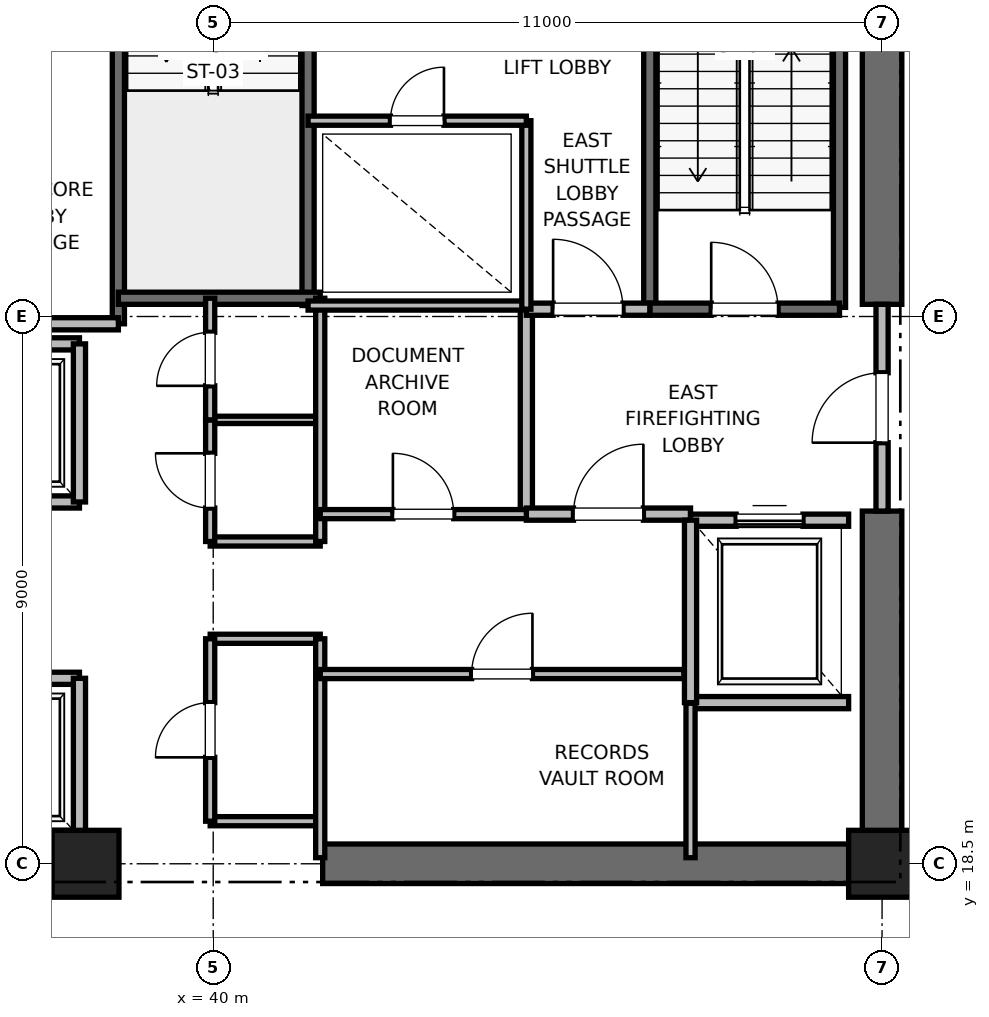
"""IFC4 building model, lengths in metres.
Left out: names, types, materials, properties, quantities, classifications, styles, units other than length and angle.
Written with IfcOpenShell. Run it as: python <this file> out.ifc"""

import sys

from ifc_helpers import new_model, si_unit, direction, frame, frame_2d, origin, origin_2d, place, context, subcontext, project, spatial, rectangle, extrude, element, fill, save


model = new_model("IFC4")
c1 = context("Model", 3, precision=1e-05, world=origin(), true_north=direction((0.0, 1.0)))
c2 = subcontext(c1, "Body", "Model", "MODEL_VIEW")
j1 = project(units=[si_unit("LENGTHUNIT", "METRE"), si_unit("PLANEANGLEUNIT", "RADIAN")], contexts=[c1])
p1 = place(None, origin())
s1 = spatial("IfcSite", under=j1, at=p1, CompositionType="ELEMENT")
p2 = place(p1, origin())
s2 = spatial("IfcBuilding", under=s1, at=p2, CompositionType="ELEMENT")
p3 = place(p2, frame((0.0, 0.0, 103.6)))
s3 = spatial("IfcBuildingStorey", under=s2, at=p3, CompositionType="ELEMENT", Elevation=103.6)
for number, where, z_axis, x_axis in (
    (1, (51.0, 18.5, 0.0), (0.0, 0.0, 1.0), (1.0, 0.0, 0.0)),
    (2, (37.9, 18.5, 0.0), (0.0, 0.0, 1.0), (1.0, 0.0, 0.0)),
):
    element("IfcColumn", number, at=place(p3, frame(where, z_axis=z_axis, x_axis=x_axis)), inside=s3, PredefinedType="PILASTER", context=c2, shape_type="SweptSolid", body=[
        extrude(rectangle(XDim=1.1, YDim=1.1, at=origin_2d()), origin(), (0.0, 0.0, 1.0), 4.0),
    ])
for number, where, z_axis, x_axis in (
    (3, (29.0, 18.5, 0.0), (0.0, 0.0, 1.0), (1.0, 0.0, 0.0)),
    (4, (41.8, 18.5, 0.0), (0.0, 0.0, 1.0), (1.0, 0.0, 0.0)),
):
    element("IfcWall", number, at=place(p3, frame(where, z_axis=z_axis, x_axis=x_axis)), inside=s3, PredefinedType="SHEAR", context=c2, shape_type="SweptSolid", body=[
        extrude(rectangle(XDim=9.2, YDim=0.65, at=frame_2d((4.6, 0.0))), origin(), (0.0, 0.0, 1.0), 3.7),
    ])
p4 = place(p3, frame((51.0, 18.5, 0.0), z_axis=(0.0, 0.0, 1.0), x_axis=(0.0, 1.0, 0.0)))
e5 = element("IfcWall", 5, at=p4, inside=s3, PredefinedType="SHEAR", context=c2, shape_type="SweptSolid", body=[
    extrude(rectangle(XDim=5.8, YDim=0.65, at=frame_2d((2.9, 0.0))), origin(), (0.0, 0.0, 1.0), 3.7),
])
p5 = place(p3, frame((51.0, 27.7, 0.0), z_axis=(0.0, 0.0, 1.0), x_axis=(0.0, 1.0, 0.0)))
e6 = element("IfcWall", 6, at=p5, inside=s3, PredefinedType="SHEAR", context=c2, shape_type="SweptSolid", body=[
    extrude(rectangle(XDim=8.8, YDim=0.65, at=frame_2d((4.4, 0.0))), origin(), (0.0, 0.0, 1.0), 3.7),
])
p6 = place(p3, frame((50.3, 27.65, 0.0), z_axis=(0.0, 0.0, 1.0), x_axis=(0.0, 1.0, 0.0)))
e7 = element("IfcWall", 7, at=p6, inside=s3, PredefinedType="SOLIDWALL", context=c2, shape_type="SweptSolid", body=[
    extrude(rectangle(XDim=8.15, YDim=0.2, at=frame_2d((4.075, 0.0))), origin(), (0.0, 0.0, 1.0), 3.7),
])
p7 = place(p3, frame((47.18, 27.62, 0.0), z_axis=(0.0, 0.0, 1.0), x_axis=(0.0, 1.0, 0.0)))
e8 = element("IfcWall", 8, at=p7, inside=s3, PredefinedType="SOLIDWALL", context=c2, shape_type="SweptSolid", body=[
    extrude(rectangle(XDim=8.18, YDim=0.2, at=frame_2d((4.09, 0.0))), origin(), (0.0, 0.0, 1.0), 3.7),
])
p8 = place(p3, frame((47.18, 27.62, 0.0), z_axis=(0.0, 0.0, 1.0), x_axis=(1.0, 0.0, 0.0)))
e9 = element("IfcWall", 9, at=p8, inside=s3, PredefinedType="SOLIDWALL", context=c2, shape_type="SweptSolid", body=[
    extrude(rectangle(XDim=3.12, YDim=0.2, at=frame_2d((1.56, 0.0))), origin(), (0.0, 0.0, 1.0), 3.7),
])
p9 = place(p8, frame((1.01, 0.0, 0.0)))
e10 = element("IfcOpeningElement", 10, at=p9, cuts=e9, PredefinedType="OPENING", context=c2, shape_type="SweptSolid", body=[
    extrude(rectangle(XDim=1.1, YDim=2.15, at=frame_2d((0.55, 1.075))), frame((0.0, 0.1, 0.0), z_axis=(0.0, -1.0, 0.0), x_axis=(1.0, 0.0, 0.0)), (0.0, 0.0, 1.0), 0.2),
])
p10 = place(p3, frame((38.44, 27.38, 0.0), z_axis=(0.0, 0.0, 1.0), x_axis=(0.0, 1.0, 0.0)))
e11 = element("IfcWall", 11, at=p10, inside=s3, PredefinedType="SOLIDWALL", context=c2, shape_type="SweptSolid", body=[
    extrude(rectangle(XDim=8.87, YDim=0.2, at=frame_2d((4.435, 0.0))), origin(), (0.0, 0.0, 1.0), 3.7),
])
p11 = place(p3, frame((41.56, 27.68, 0.0), z_axis=(0.0, 0.0, 1.0), x_axis=(0.0, 1.0, 0.0)))
e12 = element("IfcWall", 12, at=p11, inside=s3, PredefinedType="SOLIDWALL", context=c2, shape_type="SweptSolid", body=[
    extrude(rectangle(XDim=8.57, YDim=0.2, at=frame_2d((4.285, 0.0))), origin(), (0.0, 0.0, 1.0), 3.7),
])
p12 = place(p3, frame((38.44, 27.8, 0.0), z_axis=(0.0, 0.0, 1.0), x_axis=(1.0, 0.0, 0.0)))
e13 = element("IfcWall", 13, at=p12, inside=s3, PredefinedType="SOLIDWALL", context=c2, shape_type="SweptSolid", body=[
    extrude(rectangle(XDim=3.32, YDim=0.2, at=frame_2d((1.66, 0.0))), origin(), (0.0, 0.0, 1.0), 3.7),
])
p13 = place(p3, frame((32.82, 27.38, 0.0), z_axis=(0.0, 0.0, 1.0), x_axis=(1.0, 0.0, 0.0)))
e14 = element("IfcWall", 14, at=p13, inside=s3, PredefinedType="PARTITIONING", context=c2, shape_type="SweptSolid", body=[
    extrude(rectangle(XDim=5.62, YDim=0.2, at=frame_2d((2.81, 0.0))), origin(), (0.0, 0.0, 1.0), 3.7),
])
p14 = place(p3, frame((45.15, 24.25, 0.0), z_axis=(0.0, 0.0, 1.0), x_axis=(0.0, 1.0, 0.0)))
e15 = element("IfcWall", 15, at=p14, inside=s3, PredefinedType="PARTITIONING", context=c2, shape_type="SweptSolid", body=[
    extrude(rectangle(XDim=3.37, YDim=0.2, at=frame_2d((1.685, 0.0))), origin(), (0.0, 0.0, 1.0), 3.7),
])
p15 = place(p3, frame((45.15, 24.25, 0.0), z_axis=(0.0, 0.0, 1.0), x_axis=(1.0, 0.0, 0.0)))
e16 = element("IfcWall", 16, at=p15, inside=s3, PredefinedType="PARTITIONING", context=c2, shape_type="SweptSolid", body=[
    extrude(rectangle(XDim=2.7, YDim=0.2, at=frame_2d((1.35, 0.0))), origin(), (0.0, 0.0, 1.0), 3.7),
])
p16 = place(p15, frame((0.775, 0.0, 0.0)))
e17 = element("IfcOpeningElement", 17, at=p16, cuts=e16, PredefinedType="OPENING", context=c2, shape_type="SweptSolid", body=[
    extrude(rectangle(XDim=1.15, YDim=2.2, at=frame_2d((0.575, 1.1))), frame((0.0, 0.1, 0.0), z_axis=(0.0, -1.0, 0.0), x_axis=(1.0, 0.0, 0.0)), (0.0, 0.0, 1.0), 0.2),
])
p17 = place(p3, frame((45.15, 27.62, 0.0), z_axis=(0.0, 0.0, 1.0), x_axis=(1.0, 0.0, 0.0)))
e18 = element("IfcWall", 18, at=p17, inside=s3, PredefinedType="PARTITIONING", context=c2, shape_type="SweptSolid", body=[
    extrude(rectangle(XDim=2.03, YDim=0.2, at=frame_2d((1.015, 0.0))), origin(), (0.0, 0.0, 1.0), 3.7),
])
p18 = place(p17, frame((0.44, 0.0, 0.0)))
e19 = element("IfcOpeningElement", 19, at=p18, cuts=e18, PredefinedType="OPENING", context=c2, shape_type="SweptSolid", body=[
    extrude(rectangle(XDim=1.15, YDim=2.2, at=frame_2d((0.575, 1.1))), frame((0.0, 0.1, 0.0), z_axis=(0.0, -1.0, 0.0), x_axis=(1.0, 0.0, 0.0)), (0.0, 0.0, 1.0), 0.2),
])
p19 = place(p3, frame((51.0, 24.3, 0.0), z_axis=(0.0, 0.0, 1.0), x_axis=(0.0, 1.0, 0.0)))
e20 = element("IfcWall", 20, at=p19, inside=s3, PredefinedType="PARTITIONING", context=c2, shape_type="SweptSolid", body=[
    extrude(rectangle(XDim=3.4, YDim=0.2, at=frame_2d((1.7, 0.0))), origin(), (0.0, 0.0, 1.0), 2.48),
])
p20 = place(p19, frame((1.125, 0.0, 0.0)))
e21 = element("IfcOpeningElement", 21, at=p20, cuts=e20, PredefinedType="OPENING", context=c2, shape_type="SweptSolid", body=[
    extrude(rectangle(XDim=1.15, YDim=2.2, at=frame_2d((0.575, 1.1))), frame((0.0, 0.1, 0.0), z_axis=(0.0, -1.0, 0.0), x_axis=(1.0, 0.0, 0.0)), (0.0, 0.0, 1.0), 0.2),
])
p21 = place(p3, frame((47.85, 21.15, 0.0), z_axis=(0.0, 0.0, 1.0), x_axis=(1.0, 0.0, 0.0)))
e22 = element("IfcWall", 22, at=p21, inside=s3, PredefinedType="SOLIDWALL", context=c2, shape_type="SweptSolid", body=[
    extrude(rectangle(XDim=2.6, YDim=0.2, at=frame_2d((1.3, 0.0))), origin(), (0.0, 0.0, 1.0), 3.7),
])
p22 = place(p3, frame((50.45, 24.15, 0.0), z_axis=(0.0, 0.0, 1.0), x_axis=(-1.0, 0.0, 0.0)))
e23 = element("IfcWall", 23, at=p22, inside=s3, PredefinedType="SOLIDWALL", context=c2, shape_type="SweptSolid", body=[
    extrude(rectangle(XDim=2.6, YDim=0.2, at=frame_2d((1.3, 0.0))), origin(), (0.0, 0.0, 1.0), 2.48),
])
p23 = place(p22, frame((0.75, 0.0, 0.0)))
e24 = element("IfcOpeningElement", 24, at=p23, cuts=e23, PredefinedType="OPENING", context=c2, shape_type="SweptSolid", body=[
    extrude(rectangle(XDim=1.1, YDim=2.2, at=frame_2d((0.55, 1.1))), frame((0.0, 0.1, 0.0), z_axis=(0.0, -1.0, 0.0), x_axis=(1.0, 0.0, 0.0)), (0.0, 0.0, 1.0), 0.2),
])
p24 = place(p3, frame((47.85, 24.15, 0.0), z_axis=(0.0, 0.0, 1.0), x_axis=(0.0, -1.0, 0.0)))
e25 = element("IfcWall", 25, at=p24, inside=s3, PredefinedType="SOLIDWALL", context=c2, shape_type="SweptSolid", body=[
    extrude(rectangle(XDim=3.0, YDim=0.2, at=frame_2d((1.5, 0.0))), origin(), (0.0, 0.0, 1.0), 3.7),
])
p25 = place(p3, frame((35.5, 18.95, 0.0), z_axis=(0.0, 0.0, 1.0), x_axis=(1.0, 0.0, 0.0)))
e26 = element("IfcWall", 26, at=p25, inside=s3, PredefinedType="SOLIDWALL", context=c2, shape_type="SweptSolid", body=[
    extrude(rectangle(XDim=2.3, YDim=0.2, at=frame_2d((1.15, 0.0))), origin(), (0.0, 0.0, 1.0), 2.48),
])
p26 = place(p3, frame((37.8, 21.55, 0.0), z_axis=(0.0, 0.0, 1.0), x_axis=(-1.0, 0.0, 0.0)))
e27 = element("IfcWall", 27, at=p26, inside=s3, PredefinedType="SOLIDWALL", context=c2, shape_type="SweptSolid", body=[
    extrude(rectangle(XDim=2.3, YDim=0.2, at=frame_2d((1.15, 0.0))), origin(), (0.0, 0.0, 1.0), 3.7),
])
p27 = place(p26, frame((0.6, 0.0, 0.0)))
e28 = element("IfcOpeningElement", 28, at=p27, cuts=e27, PredefinedType="OPENING", context=c2, shape_type="SweptSolid", body=[
    extrude(rectangle(XDim=1.1, YDim=2.2, at=frame_2d((0.55, 1.1))), frame((0.0, 0.1, 0.0), z_axis=(0.0, -1.0, 0.0), x_axis=(1.0, 0.0, 0.0)), (0.0, 0.0, 1.0), 0.2),
])
p28 = place(p3, frame((37.8, 18.95, 0.0), z_axis=(0.0, 0.0, 1.0), x_axis=(0.0, 1.0, 0.0)))
e29 = element("IfcWall", 29, at=p28, inside=s3, PredefinedType="SOLIDWALL", context=c2, shape_type="SweptSolid", body=[
    extrude(rectangle(XDim=2.6, YDim=0.2, at=frame_2d((1.3, 0.0))), origin(), (0.0, 0.0, 1.0), 2.48),
])
p29 = place(p3, frame((35.5, 24.45, 0.0), z_axis=(0.0, 0.0, 1.0), x_axis=(1.0, 0.0, 0.0)))
e30 = element("IfcWall", 30, at=p29, inside=s3, PredefinedType="SOLIDWALL", context=c2, shape_type="SweptSolid", body=[
    extrude(rectangle(XDim=2.3, YDim=0.2, at=frame_2d((1.15, 0.0))), origin(), (0.0, 0.0, 1.0), 3.7),
])
p30 = place(p29, frame((0.6, 0.0, 0.0)))
e31 = element("IfcOpeningElement", 31, at=p30, cuts=e30, PredefinedType="OPENING", context=c2, shape_type="SweptSolid", body=[
    extrude(rectangle(XDim=1.1, YDim=2.2, at=frame_2d((0.55, 1.1))), frame((0.0, 0.1, 0.0), z_axis=(0.0, -1.0, 0.0), x_axis=(1.0, 0.0, 0.0)), (0.0, 0.0, 1.0), 0.2),
])
p31 = place(p3, frame((37.8, 27.05, 0.0), z_axis=(0.0, 0.0, 1.0), x_axis=(-1.0, 0.0, 0.0)))
e32 = element("IfcWall", 32, at=p31, inside=s3, PredefinedType="SOLIDWALL", context=c2, shape_type="SweptSolid", body=[
    extrude(rectangle(XDim=2.3, YDim=0.2, at=frame_2d((1.15, 0.0))), origin(), (0.0, 0.0, 1.0), 3.7),
])
p32 = place(p3, frame((37.8, 24.45, 0.0), z_axis=(0.0, 0.0, 1.0), x_axis=(0.0, 1.0, 0.0)))
e33 = element("IfcWall", 33, at=p32, inside=s3, PredefinedType="SOLIDWALL", context=c2, shape_type="SweptSolid", body=[
    extrude(rectangle(XDim=2.6, YDim=0.2, at=frame_2d((1.3, 0.0))), origin(), (0.0, 0.0, 1.0), 3.7),
])
for number, where, z_axis, x_axis in (
    (34, (39.95, 19.2, 0.0), (0.0, 0.0, 1.0), (1.0, 0.0, 0.0)),
    (35, (39.95, 22.2, 0.0), (0.0, 0.0, 1.0), (1.0, 0.0, 0.0)),
    (36, (39.95, 23.8, 0.0), (0.0, 0.0, 1.0), (1.0, 0.0, 0.0)),
):
    element("IfcWall", number, at=place(p3, frame(where, z_axis=z_axis, x_axis=x_axis)), inside=s3, PredefinedType="PARTITIONING", context=c2, shape_type="SweptSolid", body=[
        extrude(rectangle(XDim=1.81, YDim=0.15, at=frame_2d((0.905, 0.0))), origin(), (0.0, 0.0, 1.0), 2.85),
    ])
p33 = place(p3, frame((39.95, 25.8, 0.0), z_axis=(0.0, 0.0, 1.0), x_axis=(1.0, 0.0, 0.0)))
e37 = element("IfcWall", 37, at=p33, inside=s3, PredefinedType="PARTITIONING", context=c2, shape_type="SweptSolid", body=[
    extrude(rectangle(XDim=1.81, YDim=0.12, at=frame_2d((0.905, 0.0))), origin(), (0.0, 0.0, 1.0), 2.85),
])
p34 = place(p3, frame((41.76, 18.6, 0.0), z_axis=(0.0, 0.0, 1.0), x_axis=(0.0, 1.0, 0.0)))
e38 = element("IfcWall", 38, at=p34, inside=s3, PredefinedType="PARTITIONING", context=c2, shape_type="SweptSolid", body=[
    extrude(rectangle(XDim=3.6, YDim=0.15, at=frame_2d((1.8, 0.0))), origin(), (0.0, 0.0, 1.0), 2.48),
])
p35 = place(p3, frame((41.76, 23.8, 0.0), z_axis=(0.0, 0.0, 1.0), x_axis=(0.0, 1.0, 0.0)))
e39 = element("IfcWall", 39, at=p35, inside=s3, PredefinedType="PARTITIONING", context=c2, shape_type="SweptSolid", body=[
    extrude(rectangle(XDim=4.0, YDim=0.15, at=frame_2d((2.0, 0.0))), origin(), (0.0, 0.0, 1.0), 2.85),
])
p36 = place(p3, frame((39.95, 19.2, 0.0), z_axis=(0.0, 0.0, 1.0), x_axis=(0.0, 1.0, 0.0)))
e40 = element("IfcWall", 40, at=p36, inside=s3, PredefinedType="PARTITIONING", context=c2, shape_type="SweptSolid", body=[
    extrude(rectangle(XDim=3.0, YDim=0.15, at=frame_2d((1.5, 0.0))), origin(), (0.0, 0.0, 1.0), 2.85),
])
p37 = place(p36, frame((1.05, 0.0, 0.0)))
e41 = element("IfcOpeningElement", 41, at=p37, cuts=e40, PredefinedType="OPENING", context=c2, shape_type="SweptSolid", body=[
    extrude(rectangle(XDim=0.9, YDim=2.1, at=frame_2d((0.45, 1.05))), frame((0.0, 0.075, 0.0), z_axis=(0.0, -1.0, 0.0), x_axis=(1.0, 0.0, 0.0)), (0.0, 0.0, 1.0), 0.15),
])
p38 = place(p3, frame((39.95, 23.8, 0.0), z_axis=(0.0, 0.0, 1.0), x_axis=(0.0, 1.0, 0.0)))
e42 = element("IfcWall", 42, at=p38, inside=s3, PredefinedType="PARTITIONING", context=c2, shape_type="SweptSolid", body=[
    extrude(rectangle(XDim=2.0, YDim=0.15, at=frame_2d((1.0, 0.0))), origin(), (0.0, 0.0, 1.0), 2.85),
])
p39 = place(p38, frame((0.55, 0.0, 0.0)))
e43 = element("IfcOpeningElement", 43, at=p39, cuts=e42, PredefinedType="OPENING", context=c2, shape_type="SweptSolid", body=[
    extrude(rectangle(XDim=0.9, YDim=2.1, at=frame_2d((0.45, 1.05))), frame((0.0, 0.075, 0.0), z_axis=(0.0, -1.0, 0.0), x_axis=(1.0, 0.0, 0.0)), (0.0, 0.0, 1.0), 0.15),
])
p40 = place(p3, frame((39.95, 25.8, 0.0), z_axis=(0.0, 0.0, 1.0), x_axis=(0.0, 1.0, 0.0)))
e44 = element("IfcWall", 44, at=p40, inside=s3, PredefinedType="PARTITIONING", context=c2, shape_type="SweptSolid", body=[
    extrude(rectangle(XDim=2.0, YDim=0.15, at=frame_2d((1.0, 0.0))), origin(), (0.0, 0.0, 1.0), 2.85),
])
p41 = place(p40, frame((0.56, 0.0, 0.0)))
e45 = element("IfcOpeningElement", 45, at=p41, cuts=e44, PredefinedType="OPENING", context=c2, shape_type="SweptSolid", body=[
    extrude(rectangle(XDim=0.88, YDim=2.1, at=frame_2d((0.44, 1.05))), frame((0.0, 0.075, 0.0), z_axis=(0.0, -1.0, 0.0), x_axis=(1.0, 0.0, 0.0)), (0.0, 0.0, 1.0), 0.15),
])
p42 = place(p3, frame((41.56, 27.68, 0.0), z_axis=(0.0, 0.0, 1.0), x_axis=(1.0, 0.0, 0.0)))
e46 = element("IfcWall", 46, at=p42, inside=s3, PredefinedType="PARTITIONING", context=c2, shape_type="SweptSolid", body=[
    extrude(rectangle(XDim=3.59, YDim=0.15, at=frame_2d((1.795, 0.0))), origin(), (0.0, 0.0, 1.0), 2.85),
])
p43 = place(p3, frame((47.85, 18.6, 0.0), z_axis=(0.0, 0.0, 1.0), x_axis=(0.0, 1.0, 0.0)))
e47 = element("IfcWall", 47, at=p43, inside=s3, PredefinedType="PARTITIONING", context=c2, shape_type="SweptSolid", body=[
    extrude(rectangle(XDim=2.54, YDim=0.15, at=frame_2d((1.27, 0.0))), origin(), (0.0, 0.0, 1.0), 2.85),
])
p44 = place(p3, frame((41.76, 21.62, 0.0), z_axis=(0.0, 0.0, 1.0), x_axis=(1.0, 0.0, 0.0)))
e48 = element("IfcWall", 48, at=p44, inside=s3, PredefinedType="PARTITIONING", context=c2, shape_type="SweptSolid", body=[
    extrude(rectangle(XDim=5.98, YDim=0.15, at=frame_2d((2.99, 0.0))), origin(), (0.0, 0.0, 1.0), 2.85),
])
p45 = place(p44, frame((2.49, 0.0, 0.0)))
e49 = element("IfcOpeningElement", 49, at=p45, cuts=e48, PredefinedType="OPENING", context=c2, shape_type="SweptSolid", body=[
    extrude(rectangle(XDim=1.0, YDim=2.15, at=frame_2d((0.5, 1.075))), frame((0.0, 0.075, 0.0), z_axis=(0.0, -1.0, 0.0), x_axis=(1.0, 0.0, 0.0)), (0.0, 0.0, 1.0), 0.15),
])
p46 = place(p3, frame((41.76, 24.25, 0.0), z_axis=(0.0, 0.0, 1.0), x_axis=(1.0, 0.0, 0.0)))
e50 = element("IfcWall", 50, at=p46, inside=s3, PredefinedType="PARTITIONING", context=c2, shape_type="SweptSolid", body=[
    extrude(rectangle(XDim=3.39, YDim=0.15, at=frame_2d((1.695, 0.0))), origin(), (0.0, 0.0, 1.0), 2.85),
])
p47 = place(p46, frame((1.195, 0.0, 0.0)))
e51 = element("IfcOpeningElement", 51, at=p47, cuts=e50, PredefinedType="OPENING", context=c2, shape_type="SweptSolid", body=[
    extrude(rectangle(XDim=1.0, YDim=2.15, at=frame_2d((0.5, 1.075))), frame((0.0, 0.075, 0.0), z_axis=(0.0, -1.0, 0.0), x_axis=(1.0, 0.0, 0.0)), (0.0, 0.0, 1.0), 0.15),
])
p48 = place(p3, frame((45.15, 27.62, 0.0), z_axis=(0.0, 0.0, 1.0), x_axis=(0.0, 1.0, 0.0)))
e52 = element("IfcWall", 52, at=p48, inside=s3, PredefinedType="PARTITIONING", context=c2, shape_type="SweptSolid", body=[
    extrude(rectangle(XDim=3.1, YDim=0.15, at=frame_2d((1.55, 0.0))), origin(), (0.0, 0.0, 1.0), 2.85),
])
p49 = place(p3, frame((41.56, 30.72, 0.0), z_axis=(0.0, 0.0, 1.0), x_axis=(1.0, 0.0, 0.0)))
e53 = element("IfcWall", 53, at=p49, inside=s3, PredefinedType="PARTITIONING", context=c2, shape_type="SweptSolid", body=[
    extrude(rectangle(XDim=3.59, YDim=0.15, at=frame_2d((1.795, 0.0))), origin(), (0.0, 0.0, 1.0), 2.85),
])
p50 = place(p49, frame((1.355, 0.0, 0.0)))
e54 = element("IfcOpeningElement", 54, at=p50, cuts=e53, PredefinedType="OPENING", context=c2, shape_type="SweptSolid", body=[
    extrude(rectangle(XDim=0.88, YDim=2.1, at=frame_2d((0.44, 1.05))), frame((0.0, 0.075, 0.0), z_axis=(0.0, -1.0, 0.0), x_axis=(1.0, 0.0, 0.0)), (0.0, 0.0, 1.0), 0.15),
])
p51 = place(p9, origin())
e55 = element("IfcDoor", 55, at=p51, inside=s3, OperationType="SINGLE_SWING_LEFT", PredefinedType="DOOR", context=c2, shape_type="SweptSolid", body=[
    extrude(rectangle(XDim=1.1, YDim=2.15, at=frame_2d((0.55, 1.075))), frame((0.0, 0.025, 0.0), z_axis=(0.0, -1.0, 0.0), x_axis=(1.0, 0.0, 0.0)), (0.0, 0.0, 1.0), 0.05),
])
fill(e10, e55)
p52 = place(p16, origin())
e56 = element("IfcDoor", 56, at=p52, inside=s3, OperationType="SINGLE_SWING_RIGHT", PredefinedType="DOOR", context=c2, shape_type="SweptSolid", body=[
    extrude(rectangle(XDim=1.15, YDim=2.2, at=frame_2d((0.575, 1.1))), frame((0.0, 0.025, 0.0), z_axis=(0.0, -1.0, 0.0), x_axis=(1.0, 0.0, 0.0)), (0.0, 0.0, 1.0), 0.05),
])
fill(e17, e56)
p53 = place(p18, origin())
e57 = element("IfcDoor", 57, at=p53, inside=s3, OperationType="SINGLE_SWING_LEFT", PredefinedType="DOOR", context=c2, shape_type="SweptSolid", body=[
    extrude(rectangle(XDim=1.15, YDim=2.2, at=frame_2d((0.575, 1.1))), frame((0.0, 0.025, 0.0), z_axis=(0.0, -1.0, 0.0), x_axis=(1.0, 0.0, 0.0)), (0.0, 0.0, 1.0), 0.05),
])
fill(e19, e57)
p54 = place(p20, origin())
e58 = element("IfcDoor", 58, at=p54, inside=s3, OperationType="SINGLE_SWING_LEFT", PredefinedType="DOOR", context=c2, shape_type="SweptSolid", body=[
    extrude(rectangle(XDim=1.15, YDim=2.2, at=frame_2d((0.575, 1.1))), frame((0.0, 0.025, 0.0), z_axis=(0.0, -1.0, 0.0), x_axis=(1.0, 0.0, 0.0)), (0.0, 0.0, 1.0), 0.05),
])
fill(e21, e58)
p55 = place(p23, origin())
e59 = element("IfcDoor", 59, at=p55, inside=s3, OperationType="SLIDING_TO_RIGHT", PredefinedType="DOOR", context=c2, shape_type="SweptSolid", body=[
    extrude(rectangle(XDim=1.1, YDim=2.2, at=frame_2d((0.55, 1.1))), frame((0.0, 0.025, 0.0), z_axis=(0.0, -1.0, 0.0), x_axis=(1.0, 0.0, 0.0)), (0.0, 0.0, 1.0), 0.05),
])
fill(e24, e59)
p56 = place(p37, origin())
e60 = element("IfcDoor", 60, at=p56, inside=s3, OperationType="SINGLE_SWING_LEFT", PredefinedType="DOOR", context=c2, shape_type="SweptSolid", body=[
    extrude(rectangle(XDim=0.9, YDim=2.1, at=frame_2d((0.45, 1.05))), frame((0.0, 0.025, 0.0), z_axis=(0.0, -1.0, 0.0), x_axis=(1.0, 0.0, 0.0)), (0.0, 0.0, 1.0), 0.05),
])
fill(e41, e60)
p57 = place(p39, origin())
e61 = element("IfcDoor", 61, at=p57, inside=s3, OperationType="SINGLE_SWING_RIGHT", PredefinedType="DOOR", context=c2, shape_type="SweptSolid", body=[
    extrude(rectangle(XDim=0.9, YDim=2.1, at=frame_2d((0.45, 1.05))), frame((0.0, 0.025, 0.0), z_axis=(0.0, -1.0, 0.0), x_axis=(1.0, 0.0, 0.0)), (0.0, 0.0, 1.0), 0.05),
])
fill(e43, e61)
p58 = place(p41, origin())
e62 = element("IfcDoor", 62, at=p58, inside=s3, OperationType="SINGLE_SWING_LEFT", PredefinedType="DOOR", context=c2, shape_type="SweptSolid", body=[
    extrude(rectangle(XDim=0.88, YDim=2.1, at=frame_2d((0.44, 1.05))), frame((0.0, 0.025, 0.0), z_axis=(0.0, -1.0, 0.0), x_axis=(1.0, 0.0, 0.0)), (0.0, 0.0, 1.0), 0.05),
])
fill(e45, e62)
p59 = place(p45, origin())
e63 = element("IfcDoor", 63, at=p59, inside=s3, OperationType="SINGLE_SWING_RIGHT", PredefinedType="DOOR", context=c2, shape_type="SweptSolid", body=[
    extrude(rectangle(XDim=1.0, YDim=2.15, at=frame_2d((0.5, 1.075))), frame((0.0, 0.025, 0.0), z_axis=(0.0, -1.0, 0.0), x_axis=(1.0, 0.0, 0.0)), (0.0, 0.0, 1.0), 0.05),
])
fill(e49, e63)
p60 = place(p47, origin())
e64 = element("IfcDoor", 64, at=p60, inside=s3, OperationType="SINGLE_SWING_LEFT", PredefinedType="DOOR", context=c2, shape_type="SweptSolid", body=[
    extrude(rectangle(XDim=1.0, YDim=2.15, at=frame_2d((0.5, 1.075))), frame((0.0, 0.025, 0.0), z_axis=(0.0, -1.0, 0.0), x_axis=(1.0, 0.0, 0.0)), (0.0, 0.0, 1.0), 0.05),
])
fill(e51, e64)
p61 = place(p50, origin())
e65 = element("IfcDoor", 65, at=p61, inside=s3, OperationType="SINGLE_SWING_RIGHT", PredefinedType="DOOR", context=c2, shape_type="SweptSolid", body=[
    extrude(rectangle(XDim=0.88, YDim=2.1, at=frame_2d((0.44, 1.05))), frame((0.0, 0.025, 0.0), z_axis=(0.0, -1.0, 0.0), x_axis=(1.0, 0.0, 0.0)), (0.0, 0.0, 1.0), 0.05),
])
fill(e54, e65)
save(model, sys.argv[1])
